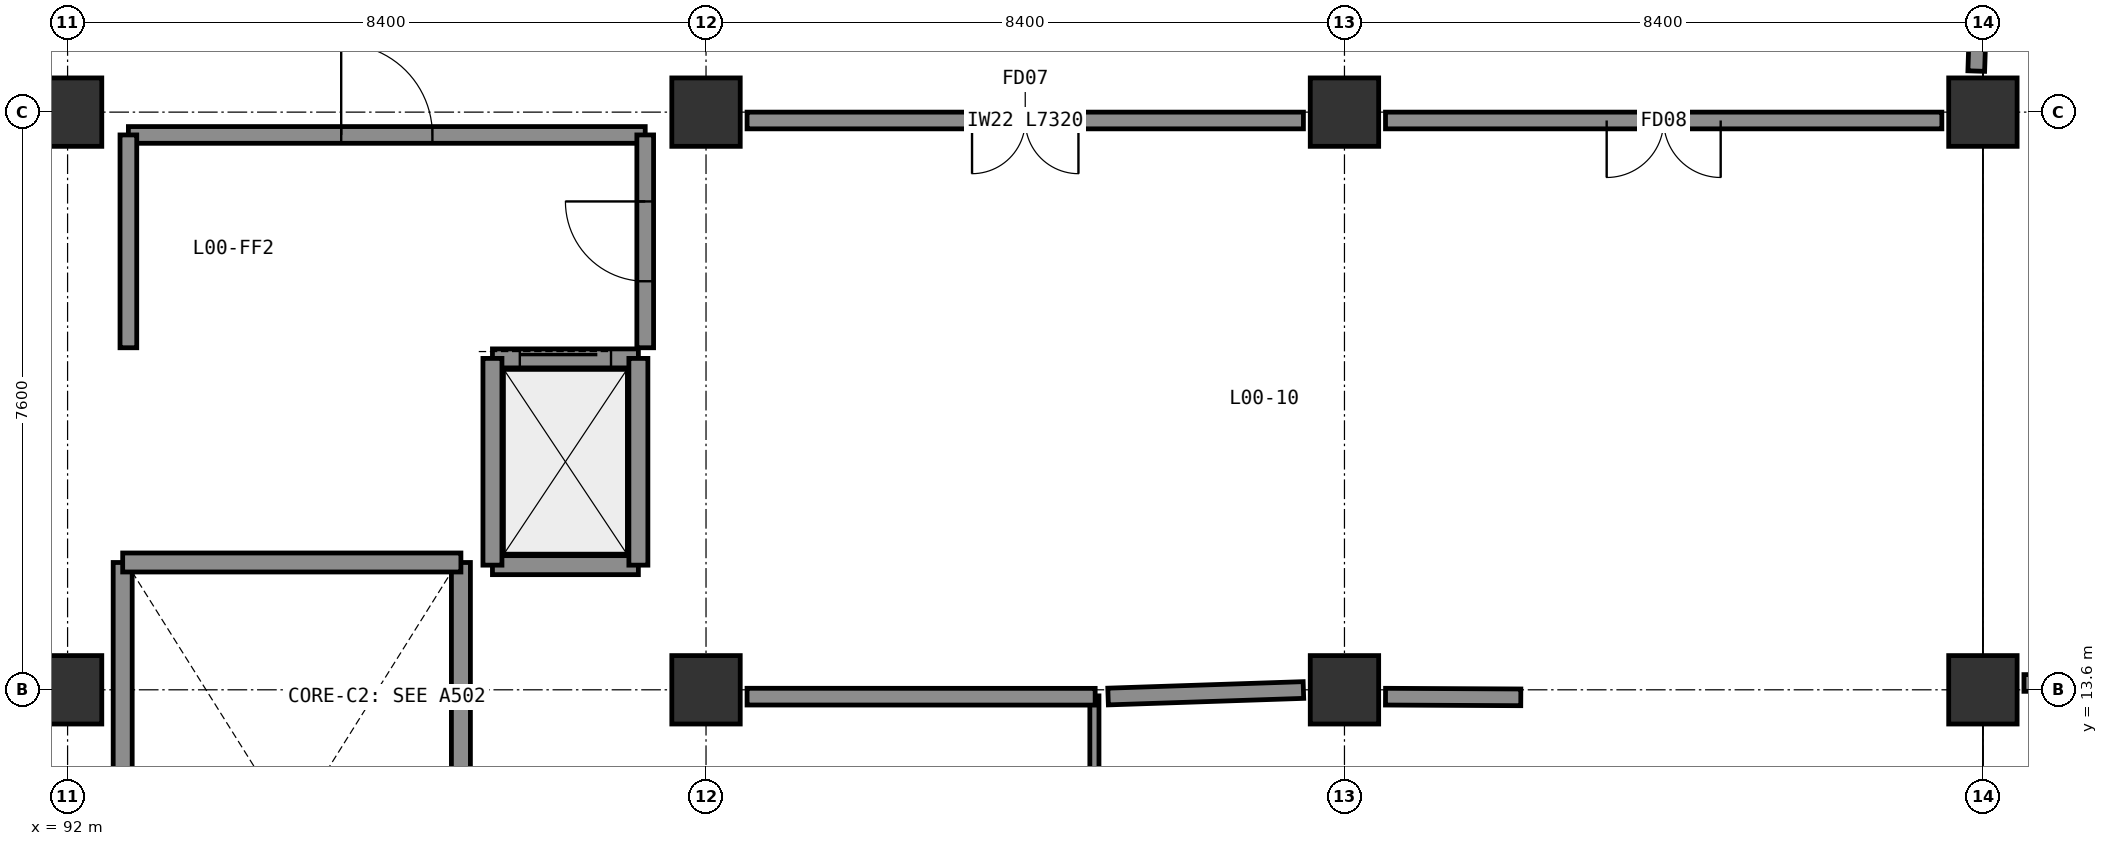
"""IFC4 building model, lengths in metres.
Left out: names, types, materials, properties, quantities, classifications, styles, units other than length and angle.
Written with IfcOpenShell. Run it as: python <this file> out.ifc"""

import sys

from ifc_helpers import new_model, si_unit, direction, frame, frame_2d, origin, origin_2d, place, context, subcontext, project, spatial, rectangle, extrude, element, fill, save


model = new_model("IFC4")
c1 = context("Model", 3, precision=1e-05, world=origin(), true_north=direction((0.0, 1.0)))
c2 = subcontext(c1, "Body", "Model", "MODEL_VIEW")
j1 = project(units=[si_unit("LENGTHUNIT", "METRE"), si_unit("PLANEANGLEUNIT", "RADIAN")], contexts=[c1])
p1 = place(None, origin())
s1 = spatial("IfcSite", under=j1, at=p1, CompositionType="ELEMENT")
p2 = place(p1, origin())
s2 = spatial("IfcBuilding", under=s1, at=p2, CompositionType="ELEMENT")
p3 = place(p2, origin())
s3 = spatial("IfcBuildingStorey", under=s2, at=p3, CompositionType="ELEMENT", Elevation=0.0)
for number, where, z_axis, x_axis in (
    (1, (92.0, 13.6, 0.0), (0.0, 0.0, 1.0), (1.0, 0.0, 0.0)),
    (2, (100.4, 13.6, 0.0), (0.0, 0.0, 1.0), (1.0, 0.0, 0.0)),
    (3, (108.8, 13.6, 0.0), (0.0, 0.0, 1.0), (1.0, 0.0, 0.0)),
    (4, (117.2, 13.6, 0.0), (0.0, 0.0, 1.0), (1.0, 0.0, 0.0)),
    (5, (92.0, 21.2, 0.0), (0.0, 0.0, 1.0), (1.0, 0.0, 0.0)),
    (6, (100.4, 21.2, 0.0), (0.0, 0.0, 1.0), (1.0, 0.0, 0.0)),
    (7, (108.8, 21.2, 0.0), (0.0, 0.0, 1.0), (1.0, 0.0, 0.0)),
    (8, (117.2, 21.2, 0.0), (0.0, 0.0, 1.0), (1.0, 0.0, 0.0)),
):
    element("IfcColumn", number, at=place(p3, frame(where, z_axis=z_axis, x_axis=x_axis)), inside=s3, PredefinedType="COLUMN", context=c2, shape_type="SweptSolid", body=[
        extrude(rectangle(XDim=0.9, YDim=0.9, at=origin_2d()), origin(), (0.0, 0.0, 1.0), 4.8),
    ])
p4 = place(p3, frame((92.725, 6.225, 0.0), z_axis=(0.0, 0.0, 1.0), x_axis=(0.0, 1.0, 0.0)))
e9 = element("IfcWall", 9, at=p4, inside=s3, PredefinedType="SHEAR", context=c2, shape_type="SweptSolid", body=[
    extrude(rectangle(XDim=9.05, YDim=0.25, at=frame_2d((4.525, 0.0))), origin(), (0.0, 0.0, 1.0), 4.52),
])
p5 = place(p3, frame((97.175, 6.225, 0.0), z_axis=(0.0, 0.0, 1.0), x_axis=(0.0, 1.0, 0.0)))
e10 = element("IfcWall", 10, at=p5, inside=s3, PredefinedType="SHEAR", context=c2, shape_type="SweptSolid", body=[
    extrude(rectangle(XDim=9.05, YDim=0.25, at=frame_2d((4.525, 0.0))), origin(), (0.0, 0.0, 1.0), 4.52),
])
p6 = place(p5, frame((0.55, 0.0, 0.0)))
e11 = element("IfcOpeningElement", 11, at=p6, cuts=e10, PredefinedType="OPENING", context=c2, shape_type="SweptSolid", body=[
    extrude(rectangle(XDim=1.05, YDim=2.1, at=frame_2d((0.525, 1.05))), frame((0.0, 0.135, 0.0), z_axis=(0.0, -1.0, 0.0), x_axis=(1.0, 0.0, 0.0)), (0.0, 0.0, 1.0), 0.27),
])
p7 = place(p3, frame((92.725, 15.275, 0.0), z_axis=(0.0, 0.0, 1.0), x_axis=(1.0, 0.0, 0.0)))
e12 = element("IfcWall", 12, at=p7, inside=s3, PredefinedType="SHEAR", context=c2, shape_type="SweptSolid", body=[
    extrude(rectangle(XDim=4.45, YDim=0.25, at=frame_2d((2.225, 0.0))), origin(), (0.0, 0.0, 1.0), 4.52),
])
p8 = place(p3, frame((92.8, 20.9, 0.0), z_axis=(0.0, 0.0, 1.0), x_axis=(1.0, 0.0, 0.0)))
e13 = element("IfcWall", 13, at=p8, inside=s3, PredefinedType="SOLIDWALL", context=c2, shape_type="SweptSolid", body=[
    extrude(rectangle(XDim=6.8, YDim=0.22, at=frame_2d((3.4, 0.0))), origin(), (0.0, 0.0, 1.0), 4.5),
])
p9 = place(p8, frame((2.8, 0.0, 0.0)))
e14 = element("IfcOpeningElement", 14, at=p9, cuts=e13, PredefinedType="OPENING", context=c2, shape_type="SweptSolid", body=[
    extrude(rectangle(XDim=1.2, YDim=2.1, at=frame_2d((0.6, 1.05))), frame((0.0, 0.12, 0.0), z_axis=(0.0, -1.0, 0.0), x_axis=(1.0, 0.0, 0.0)), (0.0, 0.0, 1.0), 0.24),
])
p10 = place(p3, frame((92.8, 18.1, 0.0), z_axis=(0.0, 0.0, 1.0), x_axis=(0.0, 1.0, 0.0)))
e15 = element("IfcWall", 15, at=p10, inside=s3, PredefinedType="SOLIDWALL", context=c2, shape_type="SweptSolid", body=[
    extrude(rectangle(XDim=2.8, YDim=0.22, at=frame_2d((1.4, 0.0))), origin(), (0.0, 0.0, 1.0), 4.5),
])
p11 = place(p3, frame((99.6, 18.1, 0.0), z_axis=(0.0, 0.0, 1.0), x_axis=(0.0, 1.0, 0.0)))
e16 = element("IfcWall", 16, at=p11, inside=s3, PredefinedType="SOLIDWALL", context=c2, shape_type="SweptSolid", body=[
    extrude(rectangle(XDim=2.8, YDim=0.22, at=frame_2d((1.4, 0.0))), origin(), (0.0, 0.0, 1.0), 4.5),
])
p12 = place(p11, frame((0.875, 0.0, 0.0)))
e17 = element("IfcOpeningElement", 17, at=p12, cuts=e16, PredefinedType="OPENING", context=c2, shape_type="SweptSolid", body=[
    extrude(rectangle(XDim=1.05, YDim=2.1, at=frame_2d((0.525, 1.05))), frame((0.0, 0.12, 0.0), z_axis=(0.0, -1.0, 0.0), x_axis=(1.0, 0.0, 0.0)), (0.0, 0.0, 1.0), 0.24),
])
p13 = place(p3, frame((97.59, 15.24, 0.0), z_axis=(0.0, 0.0, 1.0), x_axis=(1.0, 0.0, 0.0)))
e18 = element("IfcWall", 18, at=p13, inside=s3, PredefinedType="SHEAR", context=c2, shape_type="SweptSolid", body=[
    extrude(rectangle(XDim=1.92, YDim=0.25, at=frame_2d((0.96, 0.0))), origin(), (0.0, 0.0, 1.0), 4.52),
])
p14 = place(p3, frame((97.59, 17.96, 0.0), z_axis=(0.0, 0.0, 1.0), x_axis=(1.0, 0.0, 0.0)))
e19 = element("IfcWall", 19, at=p14, inside=s3, PredefinedType="SHEAR", context=c2, shape_type="SweptSolid", body=[
    extrude(rectangle(XDim=1.92, YDim=0.25, at=frame_2d((0.96, 0.0))), origin(), (0.0, 0.0, 1.0), 4.52),
])
p15 = place(p14, frame((0.36, 0.0, 0.0)))
e20 = element("IfcOpeningElement", 20, at=p15, cuts=e19, PredefinedType="OPENING", context=c2, shape_type="SweptSolid", body=[
    extrude(rectangle(XDim=1.2, YDim=2.2, at=frame_2d((0.6, 1.1))), frame((0.0, 0.135, 0.0), z_axis=(0.0, -1.0, 0.0), x_axis=(1.0, 0.0, 0.0)), (0.0, 0.0, 1.0), 0.27),
])
for number, where, z_axis, x_axis in (
    (21, (97.59, 15.24, 0.0), (0.0, 0.0, 1.0), (0.0, 1.0, 0.0)),
    (22, (99.51, 15.24, 0.0), (0.0, 0.0, 1.0), (0.0, 1.0, 0.0)),
):
    element("IfcWall", number, at=place(p3, frame(where, z_axis=z_axis, x_axis=x_axis)), inside=s3, PredefinedType="SHEAR", context=c2, shape_type="SweptSolid", body=[
        extrude(rectangle(XDim=2.72, YDim=0.25, at=frame_2d((1.36, 0.0))), origin(), (0.0, 0.0, 1.0), 4.52),
    ])
p16 = place(p3, frame((108.26, 21.09, 0.0), z_axis=(0.0, 0.0, 1.0), x_axis=(-1.0, 0.0, 0.0)))
e23 = element("IfcWall", 23, at=p16, inside=s3, PredefinedType="SOLIDWALL", context=c2, shape_type="SweptSolid", body=[
    extrude(rectangle(XDim=7.32, YDim=0.22, at=frame_2d((3.66, 0.0))), origin(), (0.0, 0.0, 1.0), 3.81),
])
p17 = place(p16, frame((2.96, 0.0, 0.0)))
e24 = element("IfcOpeningElement", 24, at=p17, cuts=e23, PredefinedType="OPENING", context=c2, shape_type="SweptSolid", body=[
    extrude(rectangle(XDim=1.4, YDim=2.15, at=frame_2d((0.7, 1.075))), frame((0.0, 0.12, 0.0), z_axis=(0.0, -1.0, 0.0), x_axis=(1.0, 0.0, 0.0)), (0.0, 0.0, 1.0), 0.24),
])
p18 = place(p3, frame((116.66, 21.09, 0.0), z_axis=(0.0, 0.0, 1.0), x_axis=(-1.0, 0.0, 0.0)))
e25 = element("IfcWall", 25, at=p18, inside=s3, PredefinedType="SOLIDWALL", context=c2, shape_type="SweptSolid", body=[
    extrude(rectangle(XDim=7.32, YDim=0.22, at=frame_2d((3.66, 0.0))), origin(), (0.0, 0.0, 1.0), 3.81),
])
p19 = place(p18, frame((2.91, 0.0, 0.0)))
e26 = element("IfcOpeningElement", 26, at=p19, cuts=e25, PredefinedType="OPENING", context=c2, shape_type="SweptSolid", body=[
    extrude(rectangle(XDim=1.5, YDim=2.15, at=frame_2d((0.75, 1.075))), frame((0.0, 0.12, 0.0), z_axis=(0.0, -1.0, 0.0), x_axis=(1.0, 0.0, 0.0)), (0.0, 0.0, 1.0), 0.24),
])
p20 = place(p3, frame((117.198, 24.32, 0.0), z_axis=(0.0, 0.0, 1.0), x_axis=(-0.032911759551, -0.999458261301, 0.0)))
e27 = element("IfcWall", 27, at=p20, inside=s3, PredefinedType="SOLIDWALL", context=c2, shape_type="SweptSolid", body=[
    extrude(rectangle(XDim=2.582, YDim=0.22, at=frame_2d((1.291, 0.0))), origin(), (0.0, 0.0, 1.0), 3.81),
])
p21 = place(p20, frame((0.841, 0.0, 0.0)))
e28 = element("IfcOpeningElement", 28, at=p21, cuts=e27, PredefinedType="OPENING", context=c2, shape_type="SweptSolid", body=[
    extrude(rectangle(XDim=0.9, YDim=2.1, at=frame_2d((0.45, 1.05))), frame((0.0, 0.12, 0.0), z_axis=(0.0, -1.0, 0.0), x_axis=(1.0, 0.0, 0.0)), (0.0, 0.0, 1.0), 0.24),
])
p22 = place(p3, frame((125.135, 13.69, 0.0), z_axis=(0.0, 0.0, 1.0), x_axis=(-1.0, 0.0, 0.0)))
e29 = element("IfcWall", 29, at=p22, inside=s3, PredefinedType="SOLIDWALL", context=c2, shape_type="SweptSolid", body=[
    extrude(rectangle(XDim=7.395, YDim=0.22, at=frame_2d((3.698, 0.0))), origin(), (0.0, 0.0, 1.0), 3.81),
])
p23 = place(p22, frame((2.748, 0.0, 0.0)))
e30 = element("IfcOpeningElement", 30, at=p23, cuts=e29, PredefinedType="OPENING", context=c2, shape_type="SweptSolid", body=[
    extrude(rectangle(XDim=1.9, YDim=2.2, at=frame_2d((0.95, 1.1))), frame((0.0, 0.12, 0.0), z_axis=(0.0, -1.0, 0.0), x_axis=(1.0, 0.0, 0.0)), (0.0, 0.0, 1.0), 0.24),
])
p24 = place(p3, frame((105.51, 13.52, 0.0), z_axis=(0.0, 0.0, 1.0), x_axis=(0.0, -1.0, 0.0)))
e31 = element("IfcWall", 31, at=p24, inside=s3, PredefinedType="PARTITIONING", context=c2, shape_type="SweptSolid", body=[
    extrude(rectangle(XDim=7.12, YDim=0.12, at=frame_2d((3.56, 0.0))), origin(), (0.0, 0.0, 1.0), 4.5),
])
p25 = place(p24, frame((2.635, 0.0, 0.0)))
e32 = element("IfcOpeningElement", 32, at=p25, cuts=e31, PredefinedType="OPENING", context=c2, shape_type="SweptSolid", body=[
    extrude(rectangle(XDim=1.85, YDim=2.22, at=frame_2d((0.925, 1.11))), frame((0.0, 0.07, 0.0), z_axis=(0.0, -1.0, 0.0), x_axis=(1.0, 0.0, 0.0)), (0.0, 0.0, 1.0), 0.14),
])
p26 = place(p3, frame((100.94, 13.51, 0.0), z_axis=(0.0, 0.0, 1.0), x_axis=(0.999999964482, -0.000266524511, 0.0)))
e33 = element("IfcWall", 33, at=p26, inside=s3, PredefinedType="SOLIDWALL", context=c2, shape_type="SweptSolid", body=[
    extrude(rectangle(XDim=4.58, YDim=0.22, at=frame_2d((2.29, 0.0))), origin(), (0.0, 0.0, 1.0), 3.81),
])
p27 = place(p3, frame((105.69, 13.511, 0.0), z_axis=(0.0, 0.0, 1.0), x_axis=(0.999441424237, 0.033419148982, 0.0)))
e34 = element("IfcWall", 34, at=p27, inside=s3, PredefinedType="SOLIDWALL", context=c2, shape_type="SweptSolid", body=[
    extrude(rectangle(XDim=2.572, YDim=0.22, at=frame_2d((1.286, 0.0))), origin(), (0.0, 0.0, 1.0), 3.81),
])
p28 = place(p3, frame((109.34, 13.51, 0.0), z_axis=(0.0, 0.0, 1.0), x_axis=(0.999988478092, -0.004800383587, 0.0)))
e35 = element("IfcWall", 35, at=p28, inside=s3, PredefinedType="SOLIDWALL", context=c2, shape_type="SweptSolid", body=[
    extrude(rectangle(XDim=1.78, YDim=0.22, at=frame_2d((0.89, 0.0))), origin(), (0.0, 0.0, 1.0), 3.81),
])
p29 = place(p9, origin())
e36 = element("IfcDoor", 36, at=p29, inside=s3, OperationType="SINGLE_SWING_LEFT", PredefinedType="DOOR", context=c2, shape_type="SweptSolid", body=[
    extrude(rectangle(XDim=1.2, YDim=2.1, at=frame_2d((0.6, 1.05))), frame((0.0, 0.025, 0.0), z_axis=(0.0, -1.0, 0.0), x_axis=(1.0, 0.0, 0.0)), (0.0, 0.0, 1.0), 0.05),
])
fill(e14, e36)
p30 = place(p12, origin())
e37 = element("IfcDoor", 37, at=p30, inside=s3, OperationType="SINGLE_SWING_RIGHT", PredefinedType="DOOR", context=c2, shape_type="SweptSolid", body=[
    extrude(rectangle(XDim=1.05, YDim=2.1, at=frame_2d((0.525, 1.05))), frame((0.0, 0.025, 0.0), z_axis=(0.0, -1.0, 0.0), x_axis=(1.0, 0.0, 0.0)), (0.0, 0.0, 1.0), 0.05),
])
fill(e17, e37)
p31 = place(p15, origin())
e38 = element("IfcDoor", 38, at=p31, inside=s3, OperationType="SLIDING_TO_LEFT", PredefinedType="DOOR", context=c2, shape_type="SweptSolid", body=[
    extrude(rectangle(XDim=1.2, YDim=2.2, at=frame_2d((0.6, 1.1))), frame((0.0, 0.025, 0.0), z_axis=(0.0, -1.0, 0.0), x_axis=(1.0, 0.0, 0.0)), (0.0, 0.0, 1.0), 0.05),
])
fill(e20, e38)
p32 = place(p17, origin())
e39 = element("IfcDoor", 39, at=p32, inside=s3, OperationType="DOUBLE_DOOR_SINGLE_SWING", PredefinedType="DOOR", context=c2, shape_type="SweptSolid", body=[
    extrude(rectangle(XDim=1.4, YDim=2.15, at=frame_2d((0.7, 1.075))), frame((0.0, 0.025, 0.0), z_axis=(0.0, -1.0, 0.0), x_axis=(1.0, 0.0, 0.0)), (0.0, 0.0, 1.0), 0.05),
])
fill(e24, e39)
p33 = place(p19, origin())
e40 = element("IfcDoor", 40, at=p33, inside=s3, OperationType="DOUBLE_DOOR_SINGLE_SWING", PredefinedType="DOOR", context=c2, shape_type="SweptSolid", body=[
    extrude(rectangle(XDim=1.5, YDim=2.15, at=frame_2d((0.75, 1.075))), frame((0.0, 0.025, 0.0), z_axis=(0.0, -1.0, 0.0), x_axis=(1.0, 0.0, 0.0)), (0.0, 0.0, 1.0), 0.05),
])
fill(e26, e40)
save(model, sys.argv[1])
